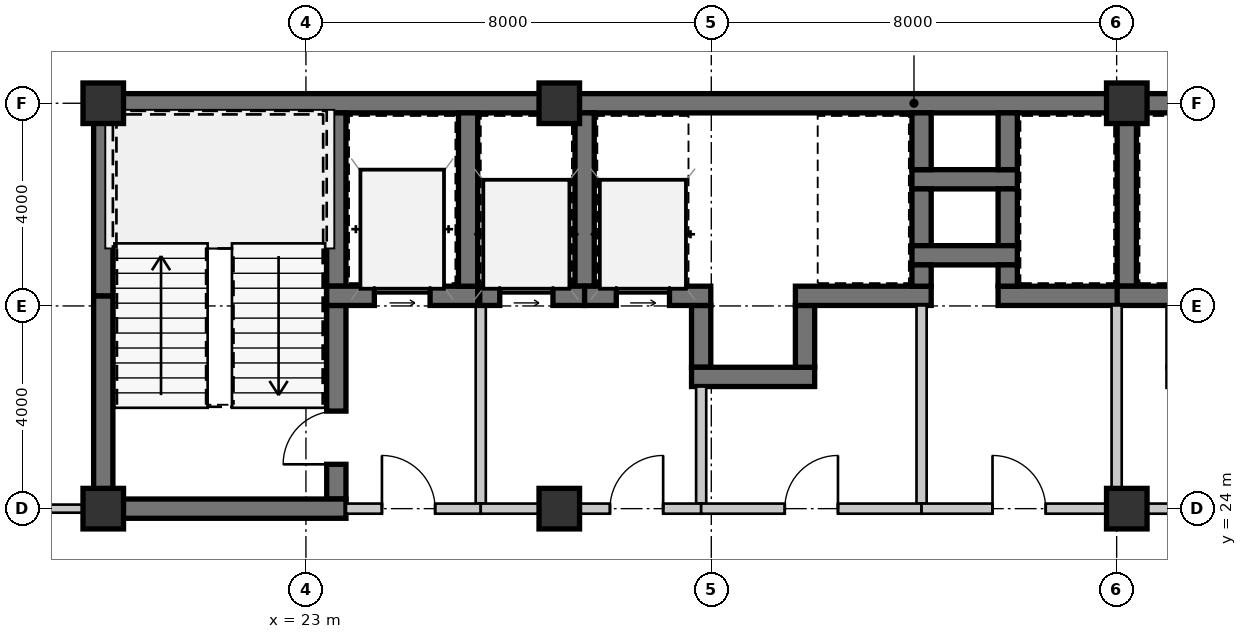
"""IFC4 building model, lengths in metres.
Left out: names, types, materials, properties, quantities, classifications, styles, units other than length and angle.
Written with IfcOpenShell. Run it as: python <this file> out.ifc"""

import sys

from ifc_helpers import new_model, si_unit, direction, frame, frame_2d, origin, origin_2d, place, context, subcontext, project, spatial, rectangle, extrude, source, transform, mapped, element, fill, save


model = new_model("IFC4")
c1 = context("Model", 3, precision=1e-05, world=origin(), true_north=direction((0.0, 1.0)))
c2 = subcontext(c1, "Body", "Model", "MODEL_VIEW")
j1 = project(units=[si_unit("LENGTHUNIT", "METRE"), si_unit("PLANEANGLEUNIT", "RADIAN")], contexts=[c1])
p1 = place(None, origin())
s1 = spatial("IfcSite", under=j1, at=p1, CompositionType="ELEMENT")
p2 = place(p1, origin())
s2 = spatial("IfcBuilding", under=s1, at=p2, CompositionType="ELEMENT")
p3 = place(p2, frame((0.0, 0.0, 38.85)))
s3 = spatial("IfcBuildingStorey", under=s2, at=p3, CompositionType="ELEMENT", Elevation=38.85)
m1 = source(origin(), c2, "Body", "SweptSolid", [
    extrude(rectangle(XDim=0.8, YDim=0.8, at=origin_2d()), origin(), (0.0, 0.0, 1.0), 3.15),
])
for number, where, z_axis, x_axis in (
    (1, (19.0, 24.0, 0.0), (0.0, 0.0, 1.0), (1.0, 0.0, 0.0)),
    (2, (28.0, 24.0, 0.0), (0.0, 0.0, 1.0), (1.0, 0.0, 0.0)),
    (3, (39.2, 24.0, 0.0), (0.0, 0.0, 1.0), (1.0, 0.0, 0.0)),
    (4, (19.0, 32.0, 0.0), (0.0, 0.0, 1.0), (1.0, 0.0, 0.0)),
    (5, (28.0, 32.0, 0.0), (0.0, 0.0, 1.0), (1.0, 0.0, 0.0)),
    (6, (39.2, 32.0, 0.0), (0.0, 0.0, 1.0), (1.0, 0.0, 0.0)),
):
    element("IfcColumn", number, at=place(p3, frame(where, z_axis=z_axis, x_axis=x_axis)), inside=s3, PredefinedType="COLUMN", context=c2, shape_type="MappedRepresentation", body=[
        mapped(m1, transform((0.0, 0.0, 0.0), scale=1.0)),
    ])
m2 = source(origin(), c2, "Body", "SweptSolid", [
    extrude(rectangle(XDim=9.19, YDim=0.38, at=frame_2d((4.595, 0.0))), origin(), (0.0, 0.0, 1.0), 2.93),
])
p4 = place(p3, frame((18.81, 32.0, 0.0), z_axis=(0.0, 0.0, 1.0), x_axis=(1.0, 0.0, 0.0)))
e7 = element("IfcWall", 7, at=p4, inside=s3, PredefinedType="SHEAR", context=c2, shape_type="MappedRepresentation", body=[
    mapped(m2, transform((0.0, 0.0, 0.0), scale=1.0)),
])
m3 = source(origin(), c2, "Body", "SweptSolid", [
    extrude(rectangle(XDim=11.2, YDim=0.38, at=frame_2d((5.6, 0.0))), origin(), (0.0, 0.0, 1.0), 2.93),
])
p5 = place(p3, frame((28.0, 32.0, 0.0), z_axis=(0.0, 0.0, 1.0), x_axis=(1.0, 0.0, 0.0)))
e8 = element("IfcWall", 8, at=p5, inside=s3, PredefinedType="SHEAR", context=c2, shape_type="MappedRepresentation", body=[
    mapped(m3, transform((0.0, 0.0, 0.0), scale=1.0)),
])
m4 = source(origin(), c2, "Body", "SweptSolid", [
    extrude(rectangle(XDim=11.99, YDim=0.38, at=frame_2d((5.995, 0.0))), origin(), (0.0, 0.0, 1.0), 2.93),
])
p6 = place(p3, frame((39.2, 32.0, 0.0), z_axis=(0.0, 0.0, 1.0), x_axis=(1.0, 0.0, 0.0)))
e9 = element("IfcWall", 9, at=p6, inside=s3, PredefinedType="SHEAR", context=c2, shape_type="MappedRepresentation", body=[
    mapped(m4, transform((0.0, 0.0, 0.0), scale=1.0)),
])
m5 = source(origin(), c2, "Body", "SweptSolid", [
    extrude(rectangle(XDim=4.01, YDim=0.38, at=frame_2d((2.005, 0.0))), origin(), (0.0, 0.0, 1.0), 2.93),
])
p7 = place(p3, frame((19.0, 24.19, 0.0), z_axis=(0.0, 0.0, 1.0), x_axis=(0.0, 1.0, 0.0)))
e10 = element("IfcWall", 10, at=p7, inside=s3, PredefinedType="SHEAR", context=c2, shape_type="MappedRepresentation", body=[
    mapped(m5, transform((0.0, 0.0, 0.0), scale=1.0)),
])
m6 = source(origin(), c2, "Body", "SweptSolid", [
    extrude(rectangle(XDim=3.61, YDim=0.38, at=frame_2d((1.805, 0.0))), origin(), (0.0, 0.0, 1.0), 2.93),
])
p8 = place(p3, frame((19.0, 28.2, 0.0), z_axis=(0.0, 0.0, 1.0), x_axis=(0.0, 1.0, 0.0)))
e11 = element("IfcWall", 11, at=p8, inside=s3, PredefinedType="SHEAR", context=c2, shape_type="MappedRepresentation", body=[
    mapped(m6, transform((0.0, 0.0, 0.0), scale=1.0)),
])
m7 = source(origin(), c2, "Body", "SweptSolid", [
    extrude(rectangle(XDim=3.42, YDim=0.38, at=frame_2d((1.71, 0.0))), origin(), (0.0, 0.0, 1.0), 2.93),
])
p9 = place(p3, frame((23.6, 28.39, 0.0), z_axis=(0.0, 0.0, 1.0), x_axis=(0.0, 1.0, 0.0)))
e12 = element("IfcWall", 12, at=p9, inside=s3, PredefinedType="SHEAR", context=c2, shape_type="MappedRepresentation", body=[
    mapped(m7, transform((0.0, 0.0, 0.0), scale=1.0)),
])
m8 = source(origin(), c2, "Body", "SweptSolid", [
    extrude(rectangle(XDim=3.82, YDim=0.38, at=frame_2d((1.91, 0.0))), origin(), (0.0, 0.0, 1.0), 2.93),
])
p10 = place(p3, frame((23.6, 24.19, 0.0), z_axis=(0.0, 0.0, 1.0), x_axis=(0.0, 1.0, 0.0)))
e13 = element("IfcWall", 13, at=p10, inside=s3, PredefinedType="SHEAR", context=c2, shape_type="MappedRepresentation", body=[
    mapped(m8, transform((0.0, 0.0, 0.0), scale=1.0)),
])
m9 = source(origin(), c2, "Body", "SweptSolid", [
    extrude(rectangle(XDim=1.05, YDim=2.1, at=frame_2d((0.525, 1.05))), frame((0.0, 0.2, 0.0), z_axis=(0.0, -1.0, 0.0), x_axis=(1.0, 0.0, 0.0)), (0.0, 0.0, 1.0), 0.4),
])
p11 = place(p10, frame((0.685, 0.0, 0.0)))
e14 = element("IfcOpeningElement", 14, at=p11, cuts=e13, PredefinedType="OPENING", context=c2, shape_type="MappedRepresentation", body=[
    mapped(m9, transform((0.0, 0.0, 0.0), scale=1.0)),
])
m10 = source(origin(), c2, "Body", "SweptSolid", [
    extrude(rectangle(XDim=4.98, YDim=0.38, at=frame_2d((2.49, 0.0))), origin(), (0.0, 0.0, 1.0), 2.93),
])
p12 = place(p3, frame((18.81, 24.0, 0.0), z_axis=(0.0, 0.0, 1.0), x_axis=(1.0, 0.0, 0.0)))
e15 = element("IfcWall", 15, at=p12, inside=s3, PredefinedType="SHEAR", context=c2, shape_type="MappedRepresentation", body=[
    mapped(m10, transform((0.0, 0.0, 0.0), scale=1.0)),
])
m11 = source(origin(), c2, "Body", "SweptSolid", [
    extrude(rectangle(XDim=2.98, YDim=0.38, at=frame_2d((1.49, 0.0))), origin(), (0.0, 0.0, 1.0), 2.93),
])
p13 = place(p3, frame((23.41, 28.2, 0.0), z_axis=(0.0, 0.0, 1.0), x_axis=(1.0, 0.0, 0.0)))
e16 = element("IfcWall", 16, at=p13, inside=s3, PredefinedType="SHEAR", context=c2, shape_type="MappedRepresentation", body=[
    mapped(m11, transform((0.0, 0.0, 0.0), scale=1.0)),
])
m12 = source(origin(), c2, "Body", "SweptSolid", [
    extrude(rectangle(XDim=1.1, YDim=2.15, at=frame_2d((0.55, 1.075))), frame((0.0, 0.2, 0.0), z_axis=(0.0, -1.0, 0.0), x_axis=(1.0, 0.0, 0.0)), (0.0, 0.0, 1.0), 0.4),
])
p14 = place(p13, frame((0.94, 0.0, 0.0)))
e17 = element("IfcOpeningElement", 17, at=p14, cuts=e16, PredefinedType="OPENING", context=c2, shape_type="MappedRepresentation", body=[
    mapped(m12, transform((0.0, 0.0, 0.0), scale=1.0)),
])
p15 = place(p3, frame((26.2, 28.39, 0.0), z_axis=(0.0, 0.0, 1.0), x_axis=(0.0, 1.0, 0.0)))
e18 = element("IfcWall", 18, at=p15, inside=s3, PredefinedType="SHEAR", context=c2, shape_type="MappedRepresentation", body=[
    mapped(m7, transform((0.0, 0.0, 0.0), scale=1.0)),
])
m13 = source(origin(), c2, "Body", "SweptSolid", [
    extrude(rectangle(XDim=3.91, YDim=0.2, at=frame_2d((1.955, 0.0))), origin(), (0.0, 0.0, 1.0), 2.93),
])
p16 = place(p3, frame((26.45, 24.1, 0.0), z_axis=(0.0, 0.0, 1.0), x_axis=(0.0, 1.0, 0.0)))
e19 = element("IfcWall", 19, at=p16, inside=s3, PredefinedType="SOLIDWALL", context=c2, shape_type="MappedRepresentation", body=[
    mapped(m13, transform((0.0, 0.0, 0.0), scale=1.0)),
])
m14 = source(origin(), c2, "Body", "SweptSolid", [
    extrude(rectangle(XDim=2.66, YDim=0.2, at=frame_2d((1.33, 0.0))), origin(), (0.0, 0.0, 1.0), 2.47),
])
p17 = place(p3, frame((23.79, 24.0, 0.0), z_axis=(0.0, 0.0, 1.0), x_axis=(1.0, 0.0, 0.0)))
e20 = element("IfcWall", 20, at=p17, inside=s3, PredefinedType="SOLIDWALL", context=c2, shape_type="MappedRepresentation", body=[
    mapped(m14, transform((0.0, 0.0, 0.0), scale=1.0)),
])
m15 = source(origin(), c2, "Body", "SweptSolid", [
    extrude(rectangle(XDim=1.05, YDim=2.1, at=frame_2d((0.525, 1.05))), frame((0.0, 0.11, 0.0), z_axis=(0.0, -1.0, 0.0), x_axis=(1.0, 0.0, 0.0)), (0.0, 0.0, 1.0), 0.22),
])
p18 = place(p17, frame((0.71, 0.0, 0.0)))
e21 = element("IfcOpeningElement", 21, at=p18, cuts=e20, PredefinedType="OPENING", context=c2, shape_type="MappedRepresentation", body=[
    mapped(m15, transform((0.0, 0.0, 0.0), scale=1.0)),
])
m16 = source(origin(), c2, "Body", "SweptSolid", [
    extrude(rectangle(XDim=2.08, YDim=0.38, at=frame_2d((1.04, 0.0))), origin(), (0.0, 0.0, 1.0), 2.93),
])
p19 = place(p3, frame((34.96, 30.5, 0.0), z_axis=(0.0, 0.0, 1.0), x_axis=(1.0, 0.0, 0.0)))
e22 = element("IfcWall", 22, at=p19, inside=s3, PredefinedType="SHEAR", context=c2, shape_type="MappedRepresentation", body=[
    mapped(m16, transform((0.0, 0.0, 0.0), scale=1.0)),
])
m17 = source(origin(), c2, "Body", "SweptSolid", [
    extrude(rectangle(XDim=1.12, YDim=0.38, at=frame_2d((0.56, 0.0))), origin(), (0.0, 0.0, 1.0), 2.93),
])
for number, where, z_axis, x_axis in (
    (23, (35.15, 31.81, 0.0), (0.0, 0.0, 1.0), (0.0, -1.0, 0.0)),
    (24, (36.85, 30.69, 0.0), (0.0, 0.0, 1.0), (0.0, 1.0, 0.0)),
    (25, (35.15, 30.31, 0.0), (0.0, 0.0, 1.0), (0.0, -1.0, 0.0)),
    (26, (36.85, 29.19, 0.0), (0.0, 0.0, 1.0), (0.0, 1.0, 0.0)),
):
    element("IfcWall", number, at=place(p3, frame(where, z_axis=z_axis, x_axis=x_axis)), inside=s3, PredefinedType="SHEAR", context=c2, shape_type="MappedRepresentation", body=[
        mapped(m17, transform((0.0, 0.0, 0.0), scale=1.0)),
    ])
p20 = place(p3, frame((34.96, 29.0, 0.0), z_axis=(0.0, 0.0, 1.0), x_axis=(1.0, 0.0, 0.0)))
e27 = element("IfcWall", 27, at=p20, inside=s3, PredefinedType="SHEAR", context=c2, shape_type="MappedRepresentation", body=[
    mapped(m16, transform((0.0, 0.0, 0.0), scale=1.0)),
])
m18 = source(origin(), c2, "Body", "SweptSolid", [
    extrude(rectangle(XDim=1.22, YDim=0.38, at=frame_2d((0.61, 0.0))), origin(), (0.0, 0.0, 1.0), 2.93),
])
p21 = place(p3, frame((30.8, 28.01, 0.0), z_axis=(0.0, 0.0, 1.0), x_axis=(0.0, -1.0, 0.0)))
e28 = element("IfcWall", 28, at=p21, inside=s3, PredefinedType="SHEAR", context=c2, shape_type="MappedRepresentation", body=[
    mapped(m18, transform((0.0, 0.0, 0.0), scale=1.0)),
])
m19 = source(origin(), c2, "Body", "SweptSolid", [
    extrude(rectangle(XDim=2.43, YDim=0.38, at=frame_2d((1.215, 0.0))), origin(), (0.0, 0.0, 1.0), 2.93),
])
p22 = place(p3, frame((30.61, 26.6, 0.0), z_axis=(0.0, 0.0, 1.0), x_axis=(1.0, 0.0, 0.0)))
e29 = element("IfcWall", 29, at=p22, inside=s3, PredefinedType="SHEAR", context=c2, shape_type="MappedRepresentation", body=[
    mapped(m19, transform((0.0, 0.0, 0.0), scale=1.0)),
])
p23 = place(p3, frame((32.85, 26.79, 0.0), z_axis=(0.0, 0.0, 1.0), x_axis=(0.0, 1.0, 0.0)))
e30 = element("IfcWall", 30, at=p23, inside=s3, PredefinedType="SHEAR", context=c2, shape_type="MappedRepresentation", body=[
    mapped(m18, transform((0.0, 0.0, 0.0), scale=1.0)),
])
p24 = place(p3, frame((28.5, 28.39, 0.0), z_axis=(0.0, 0.0, 1.0), x_axis=(0.0, 1.0, 0.0)))
e31 = element("IfcWall", 31, at=p24, inside=s3, PredefinedType="SHEAR", context=c2, shape_type="MappedRepresentation", body=[
    mapped(m7, transform((0.0, 0.0, 0.0), scale=1.0)),
])
m20 = source(origin(), c2, "Body", "SweptSolid", [
    extrude(rectangle(XDim=2.07, YDim=0.38, at=frame_2d((1.035, 0.0))), origin(), (0.0, 0.0, 1.0), 2.93),
])
p25 = place(p3, frame((26.43, 28.2, 0.0), z_axis=(0.0, 0.0, 1.0), x_axis=(1.0, 0.0, 0.0)))
e32 = element("IfcWall", 32, at=p25, inside=s3, PredefinedType="SHEAR", context=c2, shape_type="MappedRepresentation", body=[
    mapped(m20, transform((0.0, 0.0, 0.0), scale=1.0)),
])
m21 = source(origin(), c2, "Body", "SweptSolid", [
    extrude(rectangle(XDim=1.05, YDim=2.15, at=frame_2d((0.525, 1.075))), frame((0.0, 0.2, 0.0), z_axis=(0.0, -1.0, 0.0), x_axis=(1.0, 0.0, 0.0)), (0.0, 0.0, 1.0), 0.4),
])
p26 = place(p25, frame((0.395, 0.0, 0.0)))
e33 = element("IfcOpeningElement", 33, at=p26, cuts=e32, PredefinedType="OPENING", context=c2, shape_type="MappedRepresentation", body=[
    mapped(m21, transform((0.0, 0.0, 0.0), scale=1.0)),
])
m22 = source(origin(), c2, "Body", "SweptSolid", [
    extrude(rectangle(XDim=2.49, YDim=0.38, at=frame_2d((1.245, 0.0))), origin(), (0.0, 0.0, 1.0), 2.93),
])
p27 = place(p3, frame((28.5, 28.2, 0.0), z_axis=(0.0, 0.0, 1.0), x_axis=(1.0, 0.0, 0.0)))
e34 = element("IfcWall", 34, at=p27, inside=s3, PredefinedType="SHEAR", context=c2, shape_type="MappedRepresentation", body=[
    mapped(m22, transform((0.0, 0.0, 0.0), scale=1.0)),
])
p28 = place(p27, frame((0.625, 0.0, 0.0)))
e35 = element("IfcOpeningElement", 35, at=p28, cuts=e34, PredefinedType="OPENING", context=c2, shape_type="MappedRepresentation", body=[
    mapped(m21, transform((0.0, 0.0, 0.0), scale=1.0)),
])
m23 = source(origin(), c2, "Body", "SweptSolid", [
    extrude(rectangle(XDim=2.31, YDim=0.2, at=frame_2d((1.155, 0.0))), origin(), (0.0, 0.0, 1.0), 2.93),
])
p29 = place(p3, frame((30.8, 26.41, 0.0), z_axis=(0.0, 0.0, 1.0), x_axis=(0.0, -1.0, 0.0)))
e36 = element("IfcWall", 36, at=p29, inside=s3, PredefinedType="SOLIDWALL", context=c2, shape_type="MappedRepresentation", body=[
    mapped(m23, transform((0.0, 0.0, 0.0), scale=1.0)),
])
m24 = source(origin(), c2, "Body", "SweptSolid", [
    extrude(rectangle(XDim=4.35, YDim=0.2, at=frame_2d((2.175, 0.0))), origin(), (0.0, 0.0, 1.0), 2.47),
])
p30 = place(p3, frame((30.8, 24.0, 0.0), z_axis=(0.0, 0.0, 1.0), x_axis=(-1.0, 0.0, 0.0)))
e37 = element("IfcWall", 37, at=p30, inside=s3, PredefinedType="SOLIDWALL", context=c2, shape_type="MappedRepresentation", body=[
    mapped(m24, transform((0.0, 0.0, 0.0), scale=1.0)),
])
p31 = place(p30, frame((0.75, 0.0, 0.0)))
e38 = element("IfcOpeningElement", 38, at=p31, cuts=e37, PredefinedType="OPENING", context=c2, shape_type="MappedRepresentation", body=[
    mapped(m15, transform((0.0, 0.0, 0.0), scale=1.0)),
])
m25 = source(origin(), c2, "Body", "SweptSolid", [
    extrude(rectangle(XDim=2.68, YDim=0.38, at=frame_2d((1.34, 0.0))), origin(), (0.0, 0.0, 1.0), 2.93),
])
p32 = place(p3, frame((32.66, 28.2, 0.0), z_axis=(0.0, 0.0, 1.0), x_axis=(1.0, 0.0, 0.0)))
e39 = element("IfcWall", 39, at=p32, inside=s3, PredefinedType="SHEAR", context=c2, shape_type="MappedRepresentation", body=[
    mapped(m25, transform((0.0, 0.0, 0.0), scale=1.0)),
])
m26 = source(origin(), c2, "Body", "SweptSolid", [
    extrude(rectangle(XDim=0.42, YDim=0.38, at=frame_2d((0.21, 0.0))), origin(), (0.0, 0.0, 1.0), 2.93),
])
p33 = place(p3, frame((35.15, 28.39, 0.0), z_axis=(0.0, 0.0, 1.0), x_axis=(0.0, 1.0, 0.0)))
e40 = element("IfcWall", 40, at=p33, inside=s3, PredefinedType="SHEAR", context=c2, shape_type="MappedRepresentation", body=[
    mapped(m26, transform((0.0, 0.0, 0.0), scale=1.0)),
])
p34 = place(p3, frame((39.2, 28.39, 0.0), z_axis=(0.0, 0.0, 1.0), x_axis=(0.0, 1.0, 0.0)))
e41 = element("IfcWall", 41, at=p34, inside=s3, PredefinedType="SHEAR", context=c2, shape_type="MappedRepresentation", body=[
    mapped(m7, transform((0.0, 0.0, 0.0), scale=1.0)),
])
m27 = source(origin(), c2, "Body", "SweptSolid", [
    extrude(rectangle(XDim=2.36, YDim=0.38, at=frame_2d((1.18, 0.0))), origin(), (0.0, 0.0, 1.0), 2.93),
])
p35 = place(p3, frame((36.66, 28.2, 0.0), z_axis=(0.0, 0.0, 1.0), x_axis=(1.0, 0.0, 0.0)))
e42 = element("IfcWall", 42, at=p35, inside=s3, PredefinedType="SHEAR", context=c2, shape_type="MappedRepresentation", body=[
    mapped(m27, transform((0.0, 0.0, 0.0), scale=1.0)),
])
p36 = place(p3, frame((36.85, 28.81, 0.0), z_axis=(0.0, 0.0, 1.0), x_axis=(0.0, -1.0, 0.0)))
e43 = element("IfcWall", 43, at=p36, inside=s3, PredefinedType="SHEAR", context=c2, shape_type="MappedRepresentation", body=[
    mapped(m26, transform((0.0, 0.0, 0.0), scale=1.0)),
])
m28 = source(origin(), c2, "Body", "SweptSolid", [
    extrude(rectangle(XDim=1.21, YDim=0.38, at=frame_2d((0.605, 0.0))), origin(), (0.0, 0.0, 1.0), 2.93),
])
p37 = place(p3, frame((39.01, 28.2, 0.0), z_axis=(0.0, 0.0, 1.0), x_axis=(1.0, 0.0, 0.0)))
e44 = element("IfcWall", 44, at=p37, inside=s3, PredefinedType="SHEAR", context=c2, shape_type="MappedRepresentation", body=[
    mapped(m28, transform((0.0, 0.0, 0.0), scale=1.0)),
])
p38 = place(p3, frame((35.15, 28.01, 0.0), z_axis=(0.0, 0.0, 1.0), x_axis=(0.0, -1.0, 0.0)))
e45 = element("IfcWall", 45, at=p38, inside=s3, PredefinedType="SOLIDWALL", context=c2, shape_type="MappedRepresentation", body=[
    mapped(m13, transform((0.0, 0.0, 0.0), scale=1.0)),
])
m29 = source(origin(), c2, "Body", "SweptSolid", [
    extrude(rectangle(XDim=4.35, YDim=0.2, at=frame_2d((2.175, 0.0))), origin(), (0.0, 0.0, 1.0), 2.47),
])
p39 = place(p3, frame((35.15, 24.0, 0.0), z_axis=(0.0, 0.0, 1.0), x_axis=(-1.0, 0.0, 0.0)))
e46 = element("IfcWall", 46, at=p39, inside=s3, PredefinedType="SOLIDWALL", context=c2, shape_type="MappedRepresentation", body=[
    mapped(m29, transform((0.0, 0.0, 0.0), scale=1.0)),
])
p40 = place(p39, frame((1.65, 0.0, 0.0)))
e47 = element("IfcOpeningElement", 47, at=p40, cuts=e46, PredefinedType="OPENING", context=c2, shape_type="MappedRepresentation", body=[
    mapped(m15, transform((0.0, 0.0, 0.0), scale=1.0)),
])
p41 = place(p3, frame((39.0, 28.01, 0.0), z_axis=(0.0, 0.0, 1.0), x_axis=(0.0, -1.0, 0.0)))
e48 = element("IfcWall", 48, at=p41, inside=s3, PredefinedType="SOLIDWALL", context=c2, shape_type="MappedRepresentation", body=[
    mapped(m13, transform((0.0, 0.0, 0.0), scale=1.0)),
])
m30 = source(origin(), c2, "Body", "SweptSolid", [
    extrude(rectangle(XDim=3.85, YDim=0.2, at=frame_2d((1.925, 0.0))), origin(), (0.0, 0.0, 1.0), 2.47),
])
p42 = place(p3, frame((39.0, 24.0, 0.0), z_axis=(0.0, 0.0, 1.0), x_axis=(-1.0, 0.0, 0.0)))
e49 = element("IfcWall", 49, at=p42, inside=s3, PredefinedType="SOLIDWALL", context=c2, shape_type="MappedRepresentation", body=[
    mapped(m30, transform((0.0, 0.0, 0.0), scale=1.0)),
])
p43 = place(p42, frame((1.4, 0.0, 0.0)))
e50 = element("IfcOpeningElement", 50, at=p43, cuts=e49, PredefinedType="OPENING", context=c2, shape_type="MappedRepresentation", body=[
    mapped(m15, transform((0.0, 0.0, 0.0), scale=1.0)),
])
m31 = source(origin(), c2, "Body", "SweptSolid", [
    extrude(rectangle(XDim=4.55, YDim=0.2, at=frame_2d((2.275, 0.0))), origin(), (0.0, 0.0, 1.0), 2.397),
])
p44 = place(p3, frame((43.55, 24.0, 0.0), z_axis=(0.0, 0.0, 1.0), x_axis=(-1.0, 0.0, 0.0)))
e51 = element("IfcWall", 51, at=p44, inside=s3, PredefinedType="SOLIDWALL", context=c2, shape_type="MappedRepresentation", body=[
    mapped(m31, transform((0.0, 0.0, 0.0), scale=1.0)),
])
p45 = place(p44, frame((1.75, 0.0, 0.0)))
e52 = element("IfcOpeningElement", 52, at=p45, cuts=e51, PredefinedType="OPENING", context=c2, shape_type="MappedRepresentation", body=[
    mapped(m15, transform((0.0, 0.0, 0.0), scale=1.0)),
])
m32 = source(origin(), c2, "Body", "SweptSolid", [
    extrude(rectangle(XDim=4.13, YDim=0.16, at=frame_2d((2.065, 0.0))), origin(), (0.0, 0.0, 1.0), 2.93),
])
p46 = place(p3, frame((14.68, 24.0, 0.0), z_axis=(0.0, 0.0, 1.0), x_axis=(1.0, 0.0, 0.0)))
e53 = element("IfcWall", 53, at=p46, inside=s3, PredefinedType="PARTITIONING", context=c2, shape_type="MappedRepresentation", body=[
    mapped(m32, transform((0.0, 0.0, 0.0), scale=1.0)),
])
m33 = source(origin(), c2, "Body", "SweptSolid", [
    extrude(rectangle(XDim=0.92, YDim=2.1, at=frame_2d((0.46, 1.05))), frame((0.0, 0.09, 0.0), z_axis=(0.0, -1.0, 0.0), x_axis=(1.0, 0.0, 0.0)), (0.0, 0.0, 1.0), 0.18),
])
p47 = place(p46, frame((1.69, 0.0, 0.0)))
e54 = element("IfcOpeningElement", 54, at=p47, cuts=e53, PredefinedType="OPENING", context=c2, shape_type="MappedRepresentation", body=[
    mapped(m33, transform((0.0, 0.0, 0.0), scale=1.0)),
])
m34 = source(origin(), c2, "Body", "SweptSolid", [
    extrude(rectangle(XDim=1.05, YDim=2.1, at=frame_2d((0.525, 1.05))), frame((0.0, 0.025, 0.0), z_axis=(0.0, -1.0, 0.0), x_axis=(1.0, 0.0, 0.0)), (0.0, 0.0, 1.0), 0.05),
])
p48 = place(p11, origin())
e55 = element("IfcDoor", 55, at=p48, inside=s3, OperationType="SINGLE_SWING_LEFT", PredefinedType="DOOR", context=c2, shape_type="MappedRepresentation", body=[
    mapped(m34, transform((0.0, 0.0, 0.0), scale=1.0)),
])
fill(e14, e55)
m35 = source(origin(), c2, "Body", "SweptSolid", [
    extrude(rectangle(XDim=1.1, YDim=2.15, at=frame_2d((0.55, 1.075))), frame((0.0, 0.025, 0.0), z_axis=(0.0, -1.0, 0.0), x_axis=(1.0, 0.0, 0.0)), (0.0, 0.0, 1.0), 0.05),
])
p49 = place(p14, origin())
e56 = element("IfcDoor", 56, at=p49, inside=s3, OperationType="SLIDING_TO_LEFT", PredefinedType="DOOR", context=c2, shape_type="MappedRepresentation", body=[
    mapped(m35, transform((0.0, 0.0, 0.0), scale=1.0)),
])
fill(e17, e56)
p50 = place(p18, origin())
e57 = element("IfcDoor", 57, at=p50, inside=s3, OperationType="SINGLE_SWING_LEFT", PredefinedType="DOOR", context=c2, shape_type="MappedRepresentation", body=[
    mapped(m34, transform((0.0, 0.0, 0.0), scale=1.0)),
])
fill(e21, e57)
m36 = source(origin(), c2, "Body", "SweptSolid", [
    extrude(rectangle(XDim=1.05, YDim=2.15, at=frame_2d((0.525, 1.075))), frame((0.0, 0.025, 0.0), z_axis=(0.0, -1.0, 0.0), x_axis=(1.0, 0.0, 0.0)), (0.0, 0.0, 1.0), 0.05),
])
p51 = place(p26, origin())
e58 = element("IfcDoor", 58, at=p51, inside=s3, OperationType="SLIDING_TO_LEFT", PredefinedType="DOOR", context=c2, shape_type="MappedRepresentation", body=[
    mapped(m36, transform((0.0, 0.0, 0.0), scale=1.0)),
])
fill(e33, e58)
p52 = place(p28, origin())
e59 = element("IfcDoor", 59, at=p52, inside=s3, OperationType="SLIDING_TO_LEFT", PredefinedType="DOOR", context=c2, shape_type="MappedRepresentation", body=[
    mapped(m36, transform((0.0, 0.0, 0.0), scale=1.0)),
])
fill(e35, e59)
p53 = place(p31, frame((1.05, 0.0, 0.0), z_axis=(0.0, 0.0, 1.0), x_axis=(-1.0, 0.0, 0.0)))
e60 = element("IfcDoor", 60, at=p53, inside=s3, OperationType="SINGLE_SWING_RIGHT", PredefinedType="DOOR", context=c2, shape_type="MappedRepresentation", body=[
    mapped(m34, transform((0.0, 0.0, 0.0), scale=1.0)),
])
fill(e38, e60)
p54 = place(p40, frame((1.05, 0.0, 0.0), z_axis=(0.0, 0.0, 1.0), x_axis=(-1.0, 0.0, 0.0)))
e61 = element("IfcDoor", 61, at=p54, inside=s3, OperationType="SINGLE_SWING_RIGHT", PredefinedType="DOOR", context=c2, shape_type="MappedRepresentation", body=[
    mapped(m34, transform((0.0, 0.0, 0.0), scale=1.0)),
])
fill(e47, e61)
p55 = place(p43, frame((1.05, 0.0, 0.0), z_axis=(0.0, 0.0, 1.0), x_axis=(-1.0, 0.0, 0.0)))
e62 = element("IfcDoor", 62, at=p55, inside=s3, OperationType="SINGLE_SWING_LEFT", PredefinedType="DOOR", context=c2, shape_type="MappedRepresentation", body=[
    mapped(m34, transform((0.0, 0.0, 0.0), scale=1.0)),
])
fill(e50, e62)
save(model, sys.argv[1])
